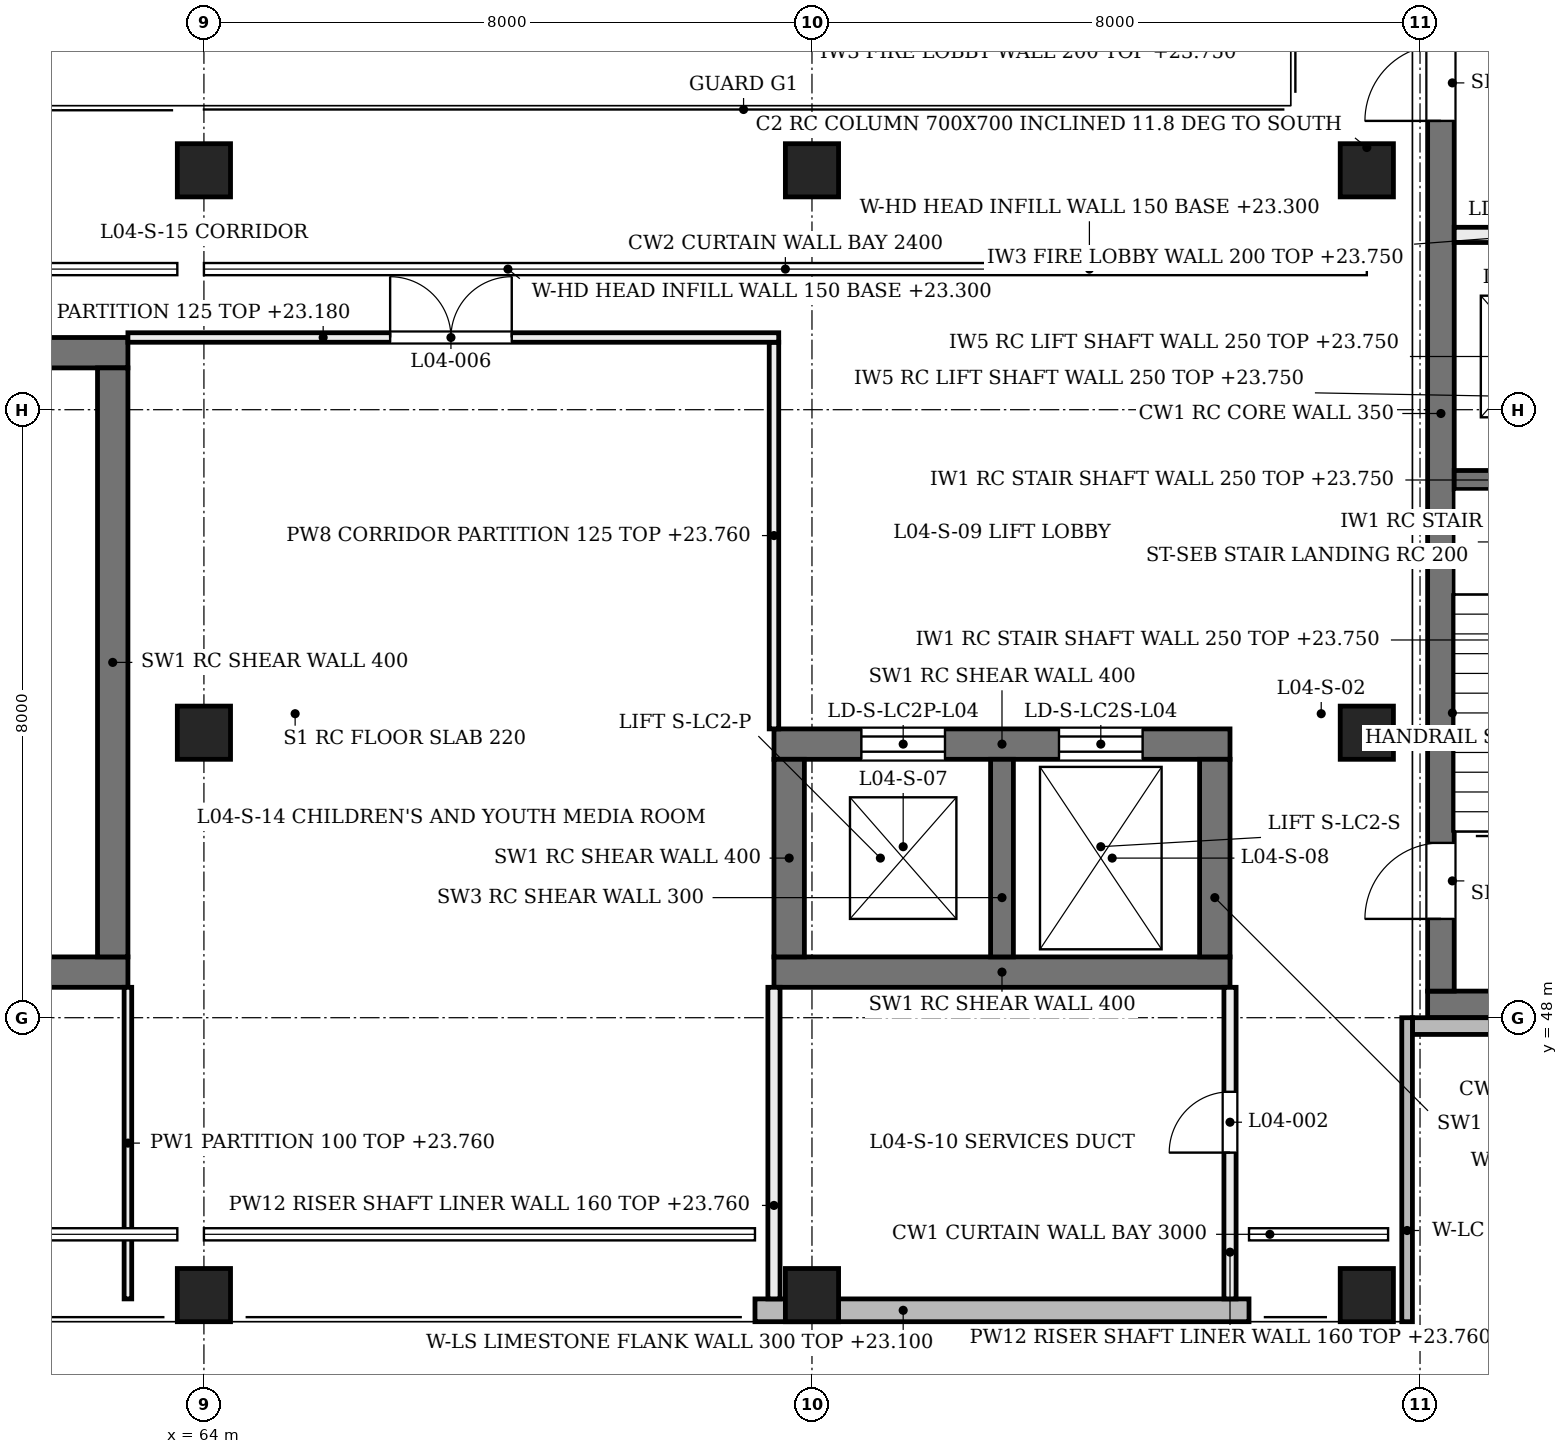
"""IFC4 building model, lengths in metres.
Left out: names, types, materials, properties, quantities, classifications, styles, units other than length and angle.
Written with IfcOpenShell. Run it as: python <this file> out.ifc"""

import sys

from ifc_helpers import new_model, si_unit, direction, frame, frame_2d, origin, origin_2d, place, context, subcontext, project, spatial, rectangle, extrude, element, fill, save


model = new_model("IFC4")
c1 = context("Model", 3, precision=1e-05, world=origin(), true_north=direction((0.0, 1.0)))
c2 = subcontext(c1, "Body", "Model", "MODEL_VIEW")
j1 = project(units=[si_unit("LENGTHUNIT", "METRE"), si_unit("PLANEANGLEUNIT", "RADIAN")], contexts=[c1])
p1 = place(None, origin())
s1 = spatial("IfcSite", under=j1, at=p1, CompositionType="ELEMENT")
p2 = place(p1, origin())
s2 = spatial("IfcBuilding", under=s1, at=p2, CompositionType="ELEMENT")
p3 = place(p2, frame((0.0, 0.0, 19.2)))
s3 = spatial("IfcBuildingStorey", under=s2, at=p3, CompositionType="ELEMENT", Elevation=19.2)
p4 = place(p3, frame((71.5, 48.6, 0.0), z_axis=(0.0, 0.0, 1.0), x_axis=(1.0, 0.0, 0.0)))
e1 = element("IfcWall", 1, at=p4, inside=s3, PredefinedType="SHEAR", context=c2, shape_type="SweptSolid", body=[
    extrude(rectangle(XDim=6.0, YDim=0.4, at=frame_2d((3.0, 0.0))), origin(), (0.0, 0.0, 1.0), 4.58),
])
p5 = place(p3, frame((71.5, 51.6, 0.0), z_axis=(0.0, 0.0, 1.0), x_axis=(1.0, 0.0, 0.0)))
e2 = element("IfcWall", 2, at=p5, inside=s3, PredefinedType="SHEAR", context=c2, shape_type="SweptSolid", body=[
    extrude(rectangle(XDim=6.0, YDim=0.4, at=frame_2d((3.0, 0.0))), origin(), (0.0, 0.0, 1.0), 4.58),
])
p6 = place(p5, frame((1.15, 0.0, 0.0)))
e3 = element("IfcOpeningElement", 3, at=p6, cuts=e2, PredefinedType="OPENING", context=c2, shape_type="SweptSolid", body=[
    extrude(rectangle(XDim=1.1, YDim=2.1, at=frame_2d((0.55, 1.05))), frame((0.0, 0.21, 0.0), z_axis=(0.0, -1.0, 0.0), x_axis=(1.0, 0.0, 0.0)), (0.0, 0.0, 1.0), 0.42),
])
p7 = place(p5, frame((3.75, 0.0, 0.0)))
e4 = element("IfcOpeningElement", 4, at=p7, cuts=e2, PredefinedType="OPENING", context=c2, shape_type="SweptSolid", body=[
    extrude(rectangle(XDim=1.1, YDim=2.1, at=frame_2d((0.55, 1.05))), frame((0.0, 0.21, 0.0), z_axis=(0.0, -1.0, 0.0), x_axis=(1.0, 0.0, 0.0)), (0.0, 0.0, 1.0), 0.42),
])
for number, where, z_axis, x_axis in (
    (5, (71.7, 48.8, 0.0), (0.0, 0.0, 1.0), (0.0, 1.0, 0.0)),
    (6, (77.3, 48.8, 0.0), (0.0, 0.0, 1.0), (0.0, 1.0, 0.0)),
):
    element("IfcWall", number, at=place(p3, frame(where, z_axis=z_axis, x_axis=x_axis)), inside=s3, PredefinedType="SHEAR", context=c2, shape_type="SweptSolid", body=[
        extrude(rectangle(XDim=2.6, YDim=0.4, at=frame_2d((1.3, 0.0))), origin(), (0.0, 0.0, 1.0), 4.58),
    ])
p8 = place(p3, frame((74.5, 48.8, 0.0), z_axis=(0.0, 0.0, 1.0), x_axis=(0.0, 1.0, 0.0)))
e7 = element("IfcWall", 7, at=p8, inside=s3, PredefinedType="SHEAR", context=c2, shape_type="SweptSolid", body=[
    extrude(rectangle(XDim=2.6, YDim=0.3, at=frame_2d((1.3, 0.0))), origin(), (0.0, 0.0, 1.0), 4.58),
])
p9 = place(p3, frame((41.0, 48.6, 0.0), z_axis=(0.0, 0.0, 1.0), x_axis=(1.0, 0.0, 0.0)))
e8 = element("IfcWall", 8, at=p9, inside=s3, PredefinedType="SHEAR", context=c2, shape_type="SweptSolid", body=[
    extrude(rectangle(XDim=22.0, YDim=0.4, at=frame_2d((11.0, 0.0))), origin(), (0.0, 0.0, 1.0), 4.58),
])
p10 = place(p3, frame((41.0, 56.75, 0.0), z_axis=(0.0, 0.0, 1.0), x_axis=(1.0, 0.0, 0.0)))
e9 = element("IfcWall", 9, at=p10, inside=s3, PredefinedType="SHEAR", context=c2, shape_type="SweptSolid", body=[
    extrude(rectangle(XDim=22.0, YDim=0.4, at=frame_2d((11.0, 0.0))), origin(), (0.0, 0.0, 1.0), 4.58),
])
p11 = place(p10, frame((10.366, 0.0, 0.0)))
e10 = element("IfcOpeningElement", 10, at=p11, cuts=e9, PredefinedType="OPENING", context=c2, shape_type="SweptSolid", body=[
    extrude(rectangle(XDim=1.5, YDim=2.1, at=frame_2d((0.75, 1.05))), frame((0.0, 0.21, 0.0), z_axis=(0.0, -1.0, 0.0), x_axis=(1.0, 0.0, 0.0)), (0.0, 0.0, 1.0), 0.42),
])
p12 = place(p3, frame((62.8, 48.8, 0.0), z_axis=(0.0, 0.0, 1.0), x_axis=(0.0, 1.0, 0.0)))
e11 = element("IfcWall", 11, at=p12, inside=s3, PredefinedType="SHEAR", context=c2, shape_type="SweptSolid", body=[
    extrude(rectangle(XDim=7.75, YDim=0.4, at=frame_2d((3.875, 0.0))), origin(), (0.0, 0.0, 1.0), 4.58),
])
p13 = place(p3, frame((80.1, 48.175, 0.0), z_axis=(0.0, 0.0, 1.0), x_axis=(1.0, 0.0, 0.0)))
e12 = element("IfcWall", 12, at=p13, inside=s3, PredefinedType="SHEAR", context=c2, shape_type="SweptSolid", body=[
    extrude(rectangle(XDim=7.95, YDim=0.35, at=frame_2d((3.975, 0.0))), origin(), (0.0, 0.0, 1.0), 4.58),
])
p14 = place(p3, frame((80.275, 48.35, 0.0), z_axis=(0.0, 0.0, 1.0), x_axis=(0.0, 1.0, 0.0)))
e13 = element("IfcWall", 13, at=p14, inside=s3, PredefinedType="SHEAR", context=c2, shape_type="SweptSolid", body=[
    extrude(rectangle(XDim=15.2, YDim=0.35, at=frame_2d((7.6, 0.0))), origin(), (0.0, 0.0, 1.0), 4.58),
])
p15 = place(p14, frame((0.95, 0.0, 0.0)))
e14 = element("IfcOpeningElement", 14, at=p15, cuts=e13, PredefinedType="OPENING", context=c2, shape_type="SweptSolid", body=[
    extrude(rectangle(XDim=1.0, YDim=2.1, at=frame_2d((0.5, 1.05))), frame((0.0, 0.185, 0.0), z_axis=(0.0, -1.0, 0.0), x_axis=(1.0, 0.0, 0.0)), (0.0, 0.0, 1.0), 0.37),
])
p16 = place(p14, frame((11.45, 0.0, 0.0)))
e15 = element("IfcOpeningElement", 15, at=p16, cuts=e13, PredefinedType="OPENING", context=c2, shape_type="SweptSolid", body=[
    extrude(rectangle(XDim=1.0, YDim=2.1, at=frame_2d((0.5, 1.05))), frame((0.0, 0.185, 0.0), z_axis=(0.0, -1.0, 0.0), x_axis=(1.0, 0.0, 0.0)), (0.0, 0.0, 1.0), 0.37),
])
for number, where, z_axis, x_axis in (
    (16, (64.0, 44.6, 0.0), (0.0, -0.204, 0.979), (1.0, 0.0, 0.0)),
    (17, (72.0, 44.6, 0.0), (0.0, -0.204, 0.979), (1.0, 0.0, 0.0)),
    (18, (79.3, 44.6, 0.0), (0.0, -0.204, 0.979), (1.0, 0.0, 0.0)),
    (19, (64.0, 52.0, 0.0), (0.0, -0.204, 0.979), (1.0, 0.0, 0.0)),
    (20, (79.3, 52.0, 0.0), (0.0, -0.204, 0.979), (1.0, 0.0, 0.0)),
    (21, (64.0, 59.4, 0.0), (0.0, -0.204, 0.979), (1.0, 0.0, 0.0)),
    (22, (72.0, 59.4, 0.0), (0.0, -0.204, 0.979), (1.0, 0.0, 0.0)),
    (23, (79.3, 59.4, 0.0), (0.0, -0.204, 0.979), (1.0, 0.0, 0.0)),
):
    element("IfcColumn", number, at=place(p3, frame(where, z_axis=z_axis, x_axis=x_axis)), inside=s3, PredefinedType="COLUMN", context=c2, shape_type="SweptSolid", body=[
        extrude(rectangle(XDim=0.7, YDim=0.7, at=origin_2d()), origin(), (0.0, 0.0, 1.0), 4.903),
    ])
p17 = place(p3, frame((71.25, 44.15, 0.0), z_axis=(0.0, 0.0, 1.0), x_axis=(1.0, 0.0, 0.0)))
e24 = element("IfcWall", 24, at=p17, inside=s3, PredefinedType="SOLIDWALL", context=c2, shape_type="SweptSolid", body=[
    extrude(rectangle(XDim=6.5, YDim=0.3, at=frame_2d((3.25, 0.0))), origin(), (0.0, 0.0, 1.0), 3.9),
])
p18 = place(p3, frame((64.2, 57.85, 4.1), z_axis=(0.0, 0.0, 1.0), x_axis=(1.0, 0.0, 0.0)))
e25 = element("IfcWall", 25, at=p18, inside=s3, PredefinedType="SOLIDWALL", context=c2, shape_type="SweptSolid", body=[
    extrude(rectangle(XDim=7.6, YDim=0.15, at=frame_2d((3.8, 0.0))), origin(), (0.0, 0.0, 1.0), 0.48),
])
p19 = place(p3, frame((72.2, 57.85, 4.1), z_axis=(0.0, 0.0, 1.0), x_axis=(1.0, 0.0, 0.0)))
e26 = element("IfcWall", 26, at=p19, inside=s3, PredefinedType="SOLIDWALL", context=c2, shape_type="SweptSolid", body=[
    extrude(rectangle(XDim=6.9, YDim=0.15, at=frame_2d((3.45, 0.0))), origin(), (0.0, 0.0, 1.0), 0.48),
])
p20 = place(p3, frame((79.9, 47.89, 0.0), z_axis=(0.0, 0.0, 1.0), x_axis=(1.0, 0.0, 0.0)))
e27 = element("IfcWall", 27, at=p20, inside=s3, PredefinedType="SOLIDWALL", context=c2, shape_type="SweptSolid", body=[
    extrude(rectangle(XDim=8.2, YDim=0.22, at=frame_2d((4.1, 0.0))), origin(), (0.0, 0.0, 1.0), 3.9),
])
p21 = place(p20, frame((1.308, 0.0, 0.9)))
e28 = element("IfcOpeningElement", 28, at=p21, cuts=e27, PredefinedType="OPENING", context=c2, shape_type="SweptSolid", body=[
    extrude(rectangle(XDim=0.45, YDim=2.6, at=frame_2d((0.225, 1.3))), frame((0.0, 0.12, 0.0), z_axis=(0.0, -1.0, 0.0), x_axis=(1.0, 0.0, 0.0)), (0.0, 0.0, 1.0), 0.24),
])
p22 = place(p20, frame((3.975, 0.0, 0.9)))
e29 = element("IfcOpeningElement", 29, at=p22, cuts=e27, PredefinedType="OPENING", context=c2, shape_type="SweptSolid", body=[
    extrude(rectangle(XDim=0.45, YDim=2.6, at=frame_2d((0.225, 1.3))), frame((0.0, 0.12, 0.0), z_axis=(0.0, -1.0, 0.0), x_axis=(1.0, 0.0, 0.0)), (0.0, 0.0, 1.0), 0.24),
])
p23 = place(p20, frame((6.642, 0.0, 0.9)))
e30 = element("IfcOpeningElement", 30, at=p23, cuts=e27, PredefinedType="OPENING", context=c2, shape_type="SweptSolid", body=[
    extrude(rectangle(XDim=0.45, YDim=2.6, at=frame_2d((0.225, 1.3))), frame((0.0, 0.12, 0.0), z_axis=(0.0, -1.0, 0.0), x_axis=(1.0, 0.0, 0.0)), (0.0, 0.0, 1.0), 0.24),
])
p24 = place(p3, frame((79.83, 44.0, 0.0), z_axis=(0.0, 0.0, 1.0), x_axis=(0.0, 1.0, 0.0)))
e31 = element("IfcWall", 31, at=p24, inside=s3, PredefinedType="SOLIDWALL", context=c2, shape_type="SweptSolid", body=[
    extrude(rectangle(XDim=4.0, YDim=0.14, at=frame_2d((2.0, 0.0))), origin(), (0.0, 0.0, 1.0), 3.9),
])
p25 = place(p3, frame((83.55, 55.075, 0.0), z_axis=(0.0, 0.0, 1.0), x_axis=(-1.0, 0.0, 0.0)))
e32 = element("IfcWall", 32, at=p25, inside=s3, PredefinedType="SOLIDWALL", context=c2, shape_type="SweptSolid", body=[
    extrude(rectangle(XDim=3.1, YDim=0.25, at=frame_2d((1.55, 0.0))), origin(), (0.0, 0.0, 1.0), 4.55),
])
p26 = place(p3, frame((87.65, 58.3, 0.0), z_axis=(0.0, 0.0, 1.0), x_axis=(-1.0, 0.0, 0.0)))
e33 = element("IfcWall", 33, at=p26, inside=s3, PredefinedType="SOLIDWALL", context=c2, shape_type="SweptSolid", body=[
    extrude(rectangle(XDim=7.2, YDim=0.2, at=frame_2d((3.6, 0.0))), origin(), (0.0, 0.0, 1.0), 4.55),
])
p27 = place(p26, frame((0.5, 0.0, 0.0)))
e34 = element("IfcOpeningElement", 34, at=p27, cuts=e33, PredefinedType="OPENING", context=c2, shape_type="SweptSolid", body=[
    extrude(rectangle(XDim=1.1, YDim=2.1, at=frame_2d((0.55, 1.05))), frame((0.0, 0.11, 0.0), z_axis=(0.0, -1.0, 0.0), x_axis=(1.0, 0.0, 0.0)), (0.0, 0.0, 1.0), 0.22),
])
p28 = place(p26, frame((5.6, 0.0, 0.0)))
e35 = element("IfcOpeningElement", 35, at=p28, cuts=e33, PredefinedType="OPENING", context=c2, shape_type="SweptSolid", body=[
    extrude(rectangle(XDim=1.1, YDim=2.1, at=frame_2d((0.55, 1.05))), frame((0.0, 0.11, 0.0), z_axis=(0.0, -1.0, 0.0), x_axis=(1.0, 0.0, 0.0)), (0.0, 0.0, 1.0), 0.22),
])
p29 = place(p26, frame((3.1, 0.0, 0.0)))
e36 = element("IfcOpeningElement", 36, at=p29, cuts=e33, PredefinedType="OPENING", context=c2, shape_type="SweptSolid", body=[
    extrude(rectangle(XDim=1.0, YDim=2.1, at=frame_2d((0.5, 1.05))), frame((0.0, 0.11, 0.0), z_axis=(0.0, -1.0, 0.0), x_axis=(1.0, 0.0, 0.0)), (0.0, 0.0, 1.0), 0.22),
])
p30 = place(p3, frame((77.5, 44.3, 0.0), z_axis=(0.0, 0.0, 1.0), x_axis=(0.0, 1.0, 0.0)))
e37 = element("IfcWall", 37, at=p30, inside=s3, PredefinedType="PARTITIONING", context=c2, shape_type="SweptSolid", body=[
    extrude(rectangle(XDim=4.1, YDim=0.16, at=frame_2d((2.05, 0.0))), origin(), (0.0, 0.0, 1.0), 4.56),
])
p31 = place(p30, frame((1.925, 0.0, 0.0)))
e38 = element("IfcOpeningElement", 38, at=p31, cuts=e37, PredefinedType="OPENING", context=c2, shape_type="SweptSolid", body=[
    extrude(rectangle(XDim=0.8, YDim=2.1, at=frame_2d((0.4, 1.05))), frame((0.0, 0.09, 0.0), z_axis=(0.0, -1.0, 0.0), x_axis=(1.0, 0.0, 0.0)), (0.0, 0.0, 1.0), 0.18),
])
p32 = place(p3, frame((71.5, 44.3, 0.0), z_axis=(0.0, 0.0, 1.0), x_axis=(0.0, 1.0, 0.0)))
e39 = element("IfcWall", 39, at=p32, inside=s3, PredefinedType="PARTITIONING", context=c2, shape_type="SweptSolid", body=[
    extrude(rectangle(XDim=4.1, YDim=0.16, at=frame_2d((2.05, 0.0))), origin(), (0.0, 0.0, 1.0), 4.56),
])
p33 = place(p3, frame((71.5, 51.8, 0.0), z_axis=(0.0, 0.0, 1.0), x_axis=(0.0, 1.0, 0.0)))
e40 = element("IfcWall", 40, at=p33, inside=s3, PredefinedType="PARTITIONING", context=c2, shape_type="SweptSolid", body=[
    extrude(rectangle(XDim=5.087, YDim=0.125, at=frame_2d((2.544, 0.0))), origin(), (0.0, 0.0, 1.0), 4.56),
])
p34 = place(p3, frame((63.0, 44.3, 0.0), z_axis=(0.0, 0.0, 1.0), x_axis=(0.0, 1.0, 0.0)))
e41 = element("IfcWall", 41, at=p34, inside=s3, PredefinedType="PARTITIONING", context=c2, shape_type="SweptSolid", body=[
    extrude(rectangle(XDim=4.1, YDim=0.1, at=frame_2d((2.05, 0.0))), origin(), (0.0, 0.0, 1.0), 4.56),
])
p35 = place(p3, frame((63.0, 56.95, 0.0), z_axis=(0.0, 0.0, 1.0), x_axis=(1.0, 0.0, 0.0)))
e42 = element("IfcWall", 42, at=p35, inside=s3, PredefinedType="PARTITIONING", context=c2, shape_type="SweptSolid", body=[
    extrude(rectangle(XDim=8.562, YDim=0.125, at=frame_2d((4.281, 0.0))), origin(), (0.0, 0.0, 1.0), 3.98),
])
p36 = place(p35, frame((3.45, 0.0, 0.0)))
e43 = element("IfcOpeningElement", 43, at=p36, cuts=e42, PredefinedType="OPENING", context=c2, shape_type="SweptSolid", body=[
    extrude(rectangle(XDim=1.6, YDim=2.2, at=frame_2d((0.8, 1.1))), frame((0.0, 0.073, 0.0), z_axis=(0.0, -1.0, 0.0), x_axis=(1.0, 0.0, 0.0)), (0.0, 0.0, 1.0), 0.145),
])
p37 = place(p15, origin())
e44 = element("IfcDoor", 44, at=p37, inside=s3, OperationType="SINGLE_SWING_LEFT", PredefinedType="DOOR", context=c2, shape_type="SweptSolid", body=[
    extrude(rectangle(XDim=1.0, YDim=2.1, at=frame_2d((0.5, 1.05))), frame((0.0, 0.025, 0.0), z_axis=(0.0, -1.0, 0.0), x_axis=(1.0, 0.0, 0.0)), (0.0, 0.0, 1.0), 0.05),
])
fill(e14, e44)
p38 = place(p16, origin())
e45 = element("IfcDoor", 45, at=p38, inside=s3, OperationType="SINGLE_SWING_LEFT", PredefinedType="DOOR", context=c2, shape_type="SweptSolid", body=[
    extrude(rectangle(XDim=1.0, YDim=2.1, at=frame_2d((0.5, 1.05))), frame((0.0, 0.025, 0.0), z_axis=(0.0, -1.0, 0.0), x_axis=(1.0, 0.0, 0.0)), (0.0, 0.0, 1.0), 0.05),
])
fill(e15, e45)
p39 = place(p6, origin())
e46 = element("IfcDoor", 46, at=p39, inside=s3, OperationType="DOUBLE_DOOR_SLIDING", PredefinedType="DOOR", context=c2, shape_type="SweptSolid", body=[
    extrude(rectangle(XDim=1.1, YDim=2.1, at=frame_2d((0.55, 1.05))), frame((0.0, 0.025, 0.0), z_axis=(0.0, -1.0, 0.0), x_axis=(1.0, 0.0, 0.0)), (0.0, 0.0, 1.0), 0.05),
])
fill(e3, e46)
p40 = place(p7, origin())
e47 = element("IfcDoor", 47, at=p40, inside=s3, OperationType="DOUBLE_DOOR_SLIDING", PredefinedType="DOOR", context=c2, shape_type="SweptSolid", body=[
    extrude(rectangle(XDim=1.1, YDim=2.1, at=frame_2d((0.55, 1.05))), frame((0.0, 0.025, 0.0), z_axis=(0.0, -1.0, 0.0), x_axis=(1.0, 0.0, 0.0)), (0.0, 0.0, 1.0), 0.05),
])
fill(e4, e47)
p41 = place(p31, origin())
e48 = element("IfcDoor", 48, at=p41, inside=s3, OperationType="SINGLE_SWING_LEFT", PredefinedType="DOOR", context=c2, shape_type="SweptSolid", body=[
    extrude(rectangle(XDim=0.8, YDim=2.1, at=frame_2d((0.4, 1.05))), frame((0.0, 0.025, 0.0), z_axis=(0.0, -1.0, 0.0), x_axis=(1.0, 0.0, 0.0)), (0.0, 0.0, 1.0), 0.05),
])
fill(e38, e48)
p42 = place(p36, origin())
e49 = element("IfcDoor", 49, at=p42, inside=s3, OperationType="DOUBLE_DOOR_SINGLE_SWING", PredefinedType="DOOR", context=c2, shape_type="SweptSolid", body=[
    extrude(rectangle(XDim=1.6, YDim=2.2, at=frame_2d((0.8, 1.1))), frame((0.0, 0.025, 0.0), z_axis=(0.0, -1.0, 0.0), x_axis=(1.0, 0.0, 0.0)), (0.0, 0.0, 1.0), 0.05),
])
fill(e43, e49)
save(model, sys.argv[1])
